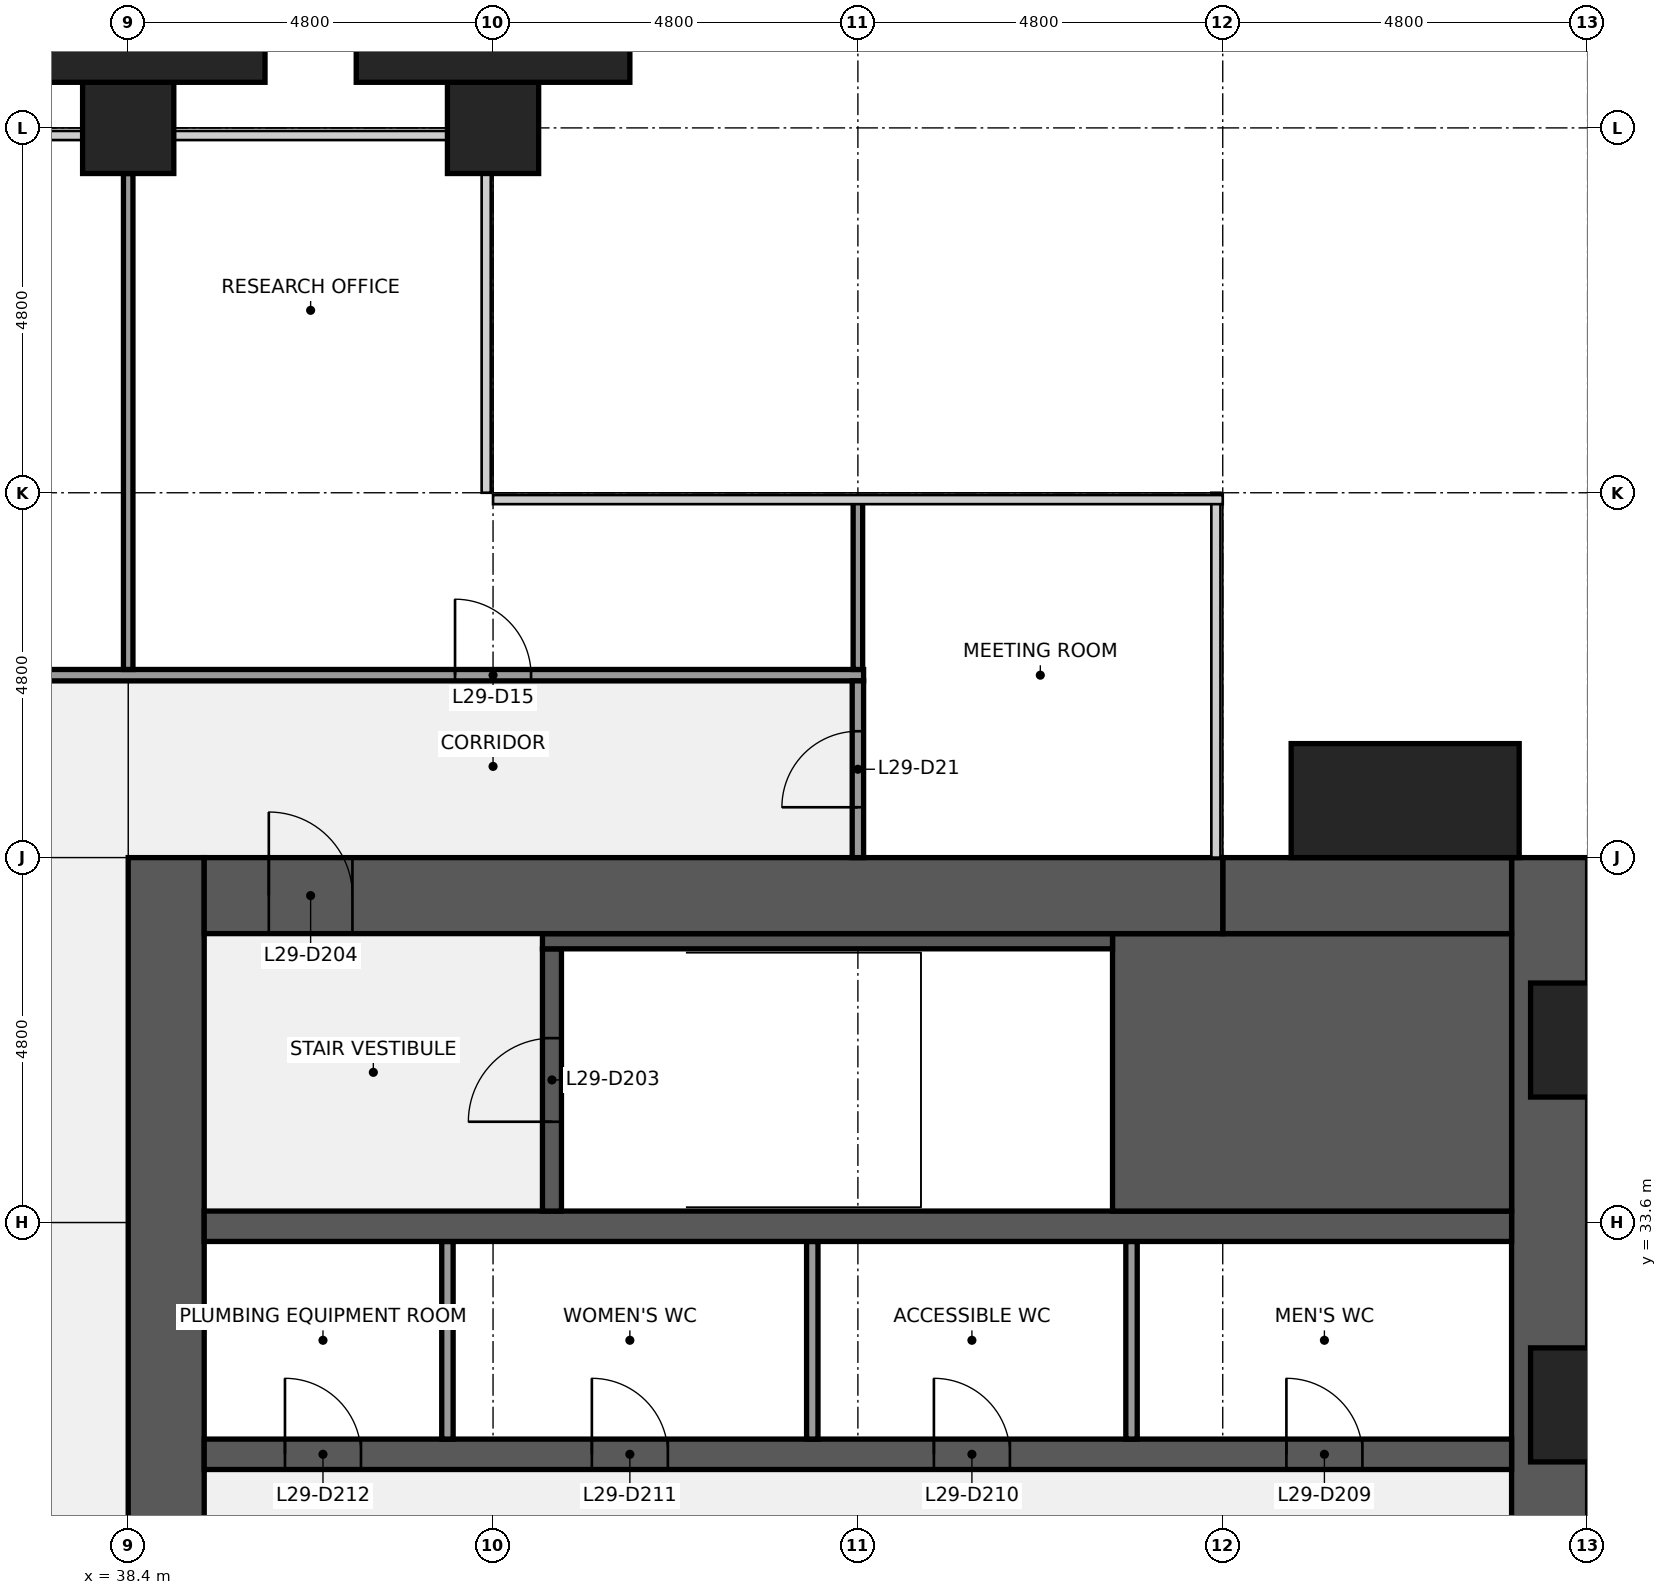
"""IFC4 building model, lengths in metres.
Left out: names, types, materials, properties, quantities, classifications, styles, units other than length and angle.
Written with IfcOpenShell. Run it as: python <this file> out.ifc"""

import sys

from ifc_helpers import new_model, si_unit, direction, frame, frame_2d, origin, origin_2d, place, context, subcontext, project, spatial, rectangle, extrude, element, fill, save


model = new_model("IFC4")
c1 = context("Model", 3, precision=1e-05, world=origin(), true_north=direction((0.0, 1.0)))
c2 = subcontext(c1, "Body", "Model", "MODEL_VIEW")
j1 = project(units=[si_unit("LENGTHUNIT", "METRE"), si_unit("PLANEANGLEUNIT", "RADIAN")], contexts=[c1])
p1 = place(None, origin())
s1 = spatial("IfcSite", under=j1, at=p1, CompositionType="ELEMENT")
p2 = place(p1, origin())
s2 = spatial("IfcBuilding", under=s1, at=p2, CompositionType="ELEMENT")
p3 = place(p2, frame((0.0, 0.0, 136.1)))
s3 = spatial("IfcBuildingStorey", under=s2, at=p3, CompositionType="ELEMENT", Elevation=136.1)
for number, where, z_axis, x_axis in (
    (1, (38.4, 48.0, 0.0), (0.0, 0.0, 1.0), (1.0, 0.0, 0.0)),
    (2, (43.2, 48.0, 0.0), (0.0, 0.0, 1.0), (1.0, 0.0, 0.0)),
):
    element("IfcColumn", number, at=place(p3, frame(where, z_axis=z_axis, x_axis=x_axis)), inside=s3, PredefinedType="COLUMN", context=c2, shape_type="SweptSolid", body=[
        extrude(rectangle(XDim=1.2, YDim=1.2, at=origin_2d()), origin(), (0.0, 0.0, 1.0), 4.0),
    ])
p4 = place(p3, frame((57.1, 38.4, 0.0), z_axis=(0.0, 0.0, 1.0), x_axis=(0.0, -1.0, 0.0)))
e3 = element("IfcWall", 3, at=p4, inside=s3, PredefinedType="SHEAR", context=c2, shape_type="SweptSolid", body=[
    extrude(rectangle(XDim=28.8, YDim=1.0, at=frame_2d((14.4, 0.0))), origin(), (0.0, 0.0, 1.0), 3.84),
])
p5 = place(p4, frame((18.45, 0.0, 0.9)))
e4 = element("IfcOpeningElement", 4, at=p5, cuts=e3, PredefinedType="OPENING", context=c2, shape_type="SweptSolid", body=[
    extrude(rectangle(XDim=1.5, YDim=1.5, at=frame_2d((0.75, 0.75))), frame((0.0, 0.51, 0.0), z_axis=(0.0, -1.0, 0.0), x_axis=(1.0, 0.0, 0.0)), (0.0, 0.0, 1.0), 1.02),
])
p6 = place(p4, frame((8.85, 0.0, 0.9)))
e5 = element("IfcOpeningElement", 5, at=p6, cuts=e3, PredefinedType="OPENING", context=c2, shape_type="SweptSolid", body=[
    extrude(rectangle(XDim=1.5, YDim=1.5, at=frame_2d((0.75, 0.75))), frame((0.0, 0.51, 0.0), z_axis=(0.0, -1.0, 0.0), x_axis=(1.0, 0.0, 0.0)), (0.0, 0.0, 1.0), 1.02),
])
p7 = place(p3, frame((38.9, 9.6, 0.0), z_axis=(0.0, 0.0, 1.0), x_axis=(0.0, 1.0, 0.0)))
e6 = element("IfcWall", 6, at=p7, inside=s3, PredefinedType="SHEAR", context=c2, shape_type="SweptSolid", body=[
    extrude(rectangle(XDim=28.8, YDim=1.0, at=frame_2d((14.4, 0.0))), origin(), (0.0, 0.0, 1.0), 3.84),
])
p8 = place(p7, frame((8.7, 0.0, 0.0)))
e7 = element("IfcOpeningElement", 7, at=p8, cuts=e6, PredefinedType="OPENING", context=c2, shape_type="SweptSolid", body=[
    extrude(rectangle(XDim=1.8, YDim=2.1, at=frame_2d((0.9, 1.05))), frame((0.0, 0.51, 0.0), z_axis=(0.0, -1.0, 0.0), x_axis=(1.0, 0.0, 0.0)), (0.0, 0.0, 1.0), 1.02),
])
p9 = place(p7, frame((18.3, 0.0, 0.0)))
e8 = element("IfcOpeningElement", 8, at=p9, cuts=e6, PredefinedType="OPENING", context=c2, shape_type="SweptSolid", body=[
    extrude(rectangle(XDim=1.8, YDim=2.1, at=frame_2d((0.9, 1.05))), frame((0.0, 0.51, 0.0), z_axis=(0.0, -1.0, 0.0), x_axis=(1.0, 0.0, 0.0)), (0.0, 0.0, 1.0), 1.02),
])
p10 = place(p3, frame((39.4, 30.55, 0.0), z_axis=(0.0, 0.0, 1.0), x_axis=(1.0, 0.0, 0.0)))
e9 = element("IfcWall", 9, at=p10, inside=s3, PredefinedType="SHEAR", context=c2, shape_type="SweptSolid", body=[
    extrude(rectangle(XDim=17.2, YDim=0.4, at=frame_2d((8.6, 0.0))), origin(), (0.0, 0.0, 1.0), 3.84),
])
p11 = place(p10, frame((14.238, 0.0, 0.0)))
e10 = element("IfcOpeningElement", 10, at=p11, cuts=e9, PredefinedType="OPENING", context=c2, shape_type="SweptSolid", body=[
    extrude(rectangle(XDim=1.0, YDim=2.1, at=frame_2d((0.5, 1.05))), frame((0.0, 0.21, 0.0), z_axis=(0.0, -1.0, 0.0), x_axis=(1.0, 0.0, 0.0)), (0.0, 0.0, 1.0), 0.42),
])
p12 = place(p10, frame((9.6, 0.0, 0.0)))
e11 = element("IfcOpeningElement", 11, at=p12, cuts=e9, PredefinedType="OPENING", context=c2, shape_type="SweptSolid", body=[
    extrude(rectangle(XDim=1.0, YDim=2.1, at=frame_2d((0.5, 1.05))), frame((0.0, 0.21, 0.0), z_axis=(0.0, -1.0, 0.0), x_axis=(1.0, 0.0, 0.0)), (0.0, 0.0, 1.0), 0.42),
])
p13 = place(p10, frame((5.1, 0.0, 0.0)))
e12 = element("IfcOpeningElement", 12, at=p13, cuts=e9, PredefinedType="OPENING", context=c2, shape_type="SweptSolid", body=[
    extrude(rectangle(XDim=1.0, YDim=2.1, at=frame_2d((0.5, 1.05))), frame((0.0, 0.21, 0.0), z_axis=(0.0, -1.0, 0.0), x_axis=(1.0, 0.0, 0.0)), (0.0, 0.0, 1.0), 0.42),
])
p14 = place(p10, frame((1.062, 0.0, 0.0)))
e13 = element("IfcOpeningElement", 13, at=p14, cuts=e9, PredefinedType="OPENING", context=c2, shape_type="SweptSolid", body=[
    extrude(rectangle(XDim=1.0, YDim=2.1, at=frame_2d((0.5, 1.05))), frame((0.0, 0.21, 0.0), z_axis=(0.0, -1.0, 0.0), x_axis=(1.0, 0.0, 0.0)), (0.0, 0.0, 1.0), 0.42),
])
for number, where, z_axis, x_axis in (
    (14, (51.6, 30.75, 0.0), (0.0, 0.0, 1.0), (0.0, 1.0, 0.0)),
    (15, (47.4, 30.75, 0.0), (0.0, 0.0, 1.0), (0.0, 1.0, 0.0)),
    (16, (42.6, 30.75, 0.0), (0.0, 0.0, 1.0), (0.0, 1.0, 0.0)),
):
    element("IfcWall", number, at=place(p3, frame(where, z_axis=z_axis, x_axis=x_axis)), inside=s3, PredefinedType="PARTITIONING", context=c2, shape_type="SweptSolid", body=[
        extrude(rectangle(XDim=2.6, YDim=0.15, at=frame_2d((1.3, 0.0))), origin(), (0.0, 0.0, 1.0), 3.84),
    ])
p15 = place(p3, frame((39.4, 33.55, 0.0), z_axis=(0.0, 0.0, 1.0), x_axis=(1.0, 0.0, 0.0)))
e17 = element("IfcWall", 17, at=p15, inside=s3, PredefinedType="SHEAR", context=c2, shape_type="SweptSolid", body=[
    extrude(rectangle(XDim=17.2, YDim=0.4, at=frame_2d((8.6, 0.0))), origin(), (0.0, 0.0, 1.0), 3.84),
])
p16 = place(p3, frame((51.35, 35.575, 0.0), z_axis=(0.0, 0.0, 1.0), x_axis=(1.0, 0.0, 0.0)))
e18 = element("IfcWall", 18, at=p16, inside=s3, PredefinedType="SHEAR", context=c2, shape_type="SweptSolid", body=[
    extrude(rectangle(XDim=5.25, YDim=3.65, at=frame_2d((2.625, 0.0))), origin(), (0.0, 0.0, 1.0), 3.84),
])
p17 = place(p3, frame((43.975, 33.75, 0.0), z_axis=(0.0, 0.0, 1.0), x_axis=(0.0, 1.0, 0.0)))
e19 = element("IfcWall", 19, at=p17, inside=s3, PredefinedType="SHEAR", context=c2, shape_type="SweptSolid", body=[
    extrude(rectangle(XDim=3.45, YDim=0.25, at=frame_2d((1.725, 0.0))), origin(), (0.0, 0.0, 1.0), 3.84),
])
p18 = place(p17, frame((1.175, 0.0, 0.0)))
e20 = element("IfcOpeningElement", 20, at=p18, cuts=e19, PredefinedType="OPENING", context=c2, shape_type="SweptSolid", body=[
    extrude(rectangle(XDim=1.1, YDim=2.1, at=frame_2d((0.55, 1.05))), frame((0.0, 0.135, 0.0), z_axis=(0.0, -1.0, 0.0), x_axis=(1.0, 0.0, 0.0)), (0.0, 0.0, 1.0), 0.27),
])
p19 = place(p3, frame((43.85, 37.3, 0.0), z_axis=(0.0, 0.0, 1.0), x_axis=(1.0, 0.0, 0.0)))
e21 = element("IfcWall", 21, at=p19, inside=s3, PredefinedType="SHEAR", context=c2, shape_type="SweptSolid", body=[
    extrude(rectangle(XDim=7.5, YDim=0.2, at=frame_2d((3.75, 0.0))), origin(), (0.0, 0.0, 1.0), 3.84),
])
p20 = place(p3, frame((52.8, 37.9, 0.0), z_axis=(0.0, 0.0, 1.0), x_axis=(1.0, 0.0, 0.0)))
e22 = element("IfcWall", 22, at=p20, inside=s3, PredefinedType="SHEAR", context=c2, shape_type="SweptSolid", body=[
    extrude(rectangle(XDim=3.8, YDim=1.0, at=frame_2d((1.9, 0.0))), origin(), (0.0, 0.0, 1.0), 3.84),
])
p21 = place(p3, frame((39.4, 37.9, 0.0), z_axis=(0.0, 0.0, 1.0), x_axis=(1.0, 0.0, 0.0)))
e23 = element("IfcWall", 23, at=p21, inside=s3, PredefinedType="SHEAR", context=c2, shape_type="SweptSolid", body=[
    extrude(rectangle(XDim=13.4, YDim=1.0, at=frame_2d((6.7, 0.0))), origin(), (0.0, 0.0, 1.0), 3.84),
])
p22 = place(p21, frame((0.85, 0.0, 0.0)))
e24 = element("IfcOpeningElement", 24, at=p22, cuts=e23, PredefinedType="OPENING", context=c2, shape_type="SweptSolid", body=[
    extrude(rectangle(XDim=1.1, YDim=2.1, at=frame_2d((0.55, 1.05))), frame((0.0, 0.51, 0.0), z_axis=(0.0, -1.0, 0.0), x_axis=(1.0, 0.0, 0.0)), (0.0, 0.0, 1.0), 1.02),
])
p23 = place(p3, frame((9.525, 40.8, 0.0), z_axis=(0.0, 0.0, 1.0), x_axis=(1.0, 0.0, 0.0)))
e25 = element("IfcWall", 25, at=p23, inside=s3, PredefinedType="PARTITIONING", context=c2, shape_type="SweptSolid", body=[
    extrude(rectangle(XDim=38.55, YDim=0.15, at=frame_2d((19.275, 0.0))), origin(), (0.0, 0.0, 1.0), 2.849),
])
p24 = place(p23, frame((4.375, 0.0, 0.0)))
e26 = element("IfcOpeningElement", 26, at=p24, cuts=e25, PredefinedType="OPENING", context=c2, shape_type="SweptSolid", body=[
    extrude(rectangle(XDim=1.0, YDim=2.1, at=frame_2d((0.5, 1.05))), frame((0.0, 0.085, 0.0), z_axis=(0.0, -1.0, 0.0), x_axis=(1.0, 0.0, 0.0)), (0.0, 0.0, 1.0), 0.17),
])
p25 = place(p23, frame((12.775, 0.0, 0.0)))
e27 = element("IfcOpeningElement", 27, at=p25, cuts=e25, PredefinedType="OPENING", context=c2, shape_type="SweptSolid", body=[
    extrude(rectangle(XDim=1.0, YDim=2.1, at=frame_2d((0.5, 1.05))), frame((0.0, 0.085, 0.0), z_axis=(0.0, -1.0, 0.0), x_axis=(1.0, 0.0, 0.0)), (0.0, 0.0, 1.0), 0.17),
])
p26 = place(p23, frame((17.575, 0.0, 0.0)))
e28 = element("IfcOpeningElement", 28, at=p26, cuts=e25, PredefinedType="OPENING", context=c2, shape_type="SweptSolid", body=[
    extrude(rectangle(XDim=1.0, YDim=2.1, at=frame_2d((0.5, 1.05))), frame((0.0, 0.085, 0.0), z_axis=(0.0, -1.0, 0.0), x_axis=(1.0, 0.0, 0.0)), (0.0, 0.0, 1.0), 0.17),
])
p27 = place(p23, frame((21.175, 0.0, 0.0)))
e29 = element("IfcOpeningElement", 29, at=p27, cuts=e25, PredefinedType="OPENING", context=c2, shape_type="SweptSolid", body=[
    extrude(rectangle(XDim=1.0, YDim=2.1, at=frame_2d((0.5, 1.05))), frame((0.0, 0.085, 0.0), z_axis=(0.0, -1.0, 0.0), x_axis=(1.0, 0.0, 0.0)), (0.0, 0.0, 1.0), 0.17),
])
p28 = place(p23, frame((25.975, 0.0, 0.0)))
e30 = element("IfcOpeningElement", 30, at=p28, cuts=e25, PredefinedType="OPENING", context=c2, shape_type="SweptSolid", body=[
    extrude(rectangle(XDim=1.0, YDim=2.1, at=frame_2d((0.5, 1.05))), frame((0.0, 0.085, 0.0), z_axis=(0.0, -1.0, 0.0), x_axis=(1.0, 0.0, 0.0)), (0.0, 0.0, 1.0), 0.17),
])
p29 = place(p23, frame((33.175, 0.0, 0.0)))
e31 = element("IfcOpeningElement", 31, at=p29, cuts=e25, PredefinedType="OPENING", context=c2, shape_type="SweptSolid", body=[
    extrude(rectangle(XDim=1.0, YDim=2.1, at=frame_2d((0.5, 1.05))), frame((0.0, 0.085, 0.0), z_axis=(0.0, -1.0, 0.0), x_axis=(1.0, 0.0, 0.0)), (0.0, 0.0, 1.0), 0.17),
])
p30 = place(p3, frame((38.4, 40.875, 0.0), z_axis=(0.0, 0.0, 1.0), x_axis=(0.0, 1.0, 0.0)))
e32 = element("IfcWall", 32, at=p30, inside=s3, PredefinedType="PARTITIONING", context=c2, shape_type="SweptSolid", body=[
    extrude(rectangle(XDim=6.525, YDim=0.125, at=frame_2d((3.262, 0.0))), origin(), (0.0, 0.0, 1.0), 2.849),
])
p31 = place(p3, frame((48.0, 40.875, 0.0), z_axis=(0.0, 0.0, 1.0), x_axis=(0.0, 1.0, 0.0)))
e33 = element("IfcWall", 33, at=p31, inside=s3, PredefinedType="PARTITIONING", context=c2, shape_type="SweptSolid", body=[
    extrude(rectangle(XDim=2.225, YDim=0.125, at=frame_2d((1.113, 0.0))), origin(), (0.0, 0.0, 1.0), 2.849),
])
p32 = place(p3, frame((48.0, 38.4, 0.0), z_axis=(0.0, 0.0, 1.0), x_axis=(0.0, 1.0, 0.0)))
e34 = element("IfcWall", 34, at=p32, inside=s3, PredefinedType="PARTITIONING", context=c2, shape_type="SweptSolid", body=[
    extrude(rectangle(XDim=2.325, YDim=0.15, at=frame_2d((1.163, 0.0))), origin(), (0.0, 0.0, 1.0), 2.849),
])
p33 = place(p32, frame((0.663, 0.0, 0.0)))
e35 = element("IfcOpeningElement", 35, at=p33, cuts=e34, PredefinedType="OPENING", context=c2, shape_type="SweptSolid", body=[
    extrude(rectangle(XDim=1.0, YDim=2.1, at=frame_2d((0.5, 1.05))), frame((0.0, 0.085, 0.0), z_axis=(0.0, -1.0, 0.0), x_axis=(1.0, 0.0, 0.0)), (0.0, 0.0, 1.0), 0.17),
])
p34 = place(p3, frame((55.2, 39.15, 0.0), z_axis=(0.0, 0.0, 1.0), x_axis=(1.0, 0.0, 0.0)))
e36 = element("IfcColumn", 36, at=p34, inside=s3, PredefinedType="PILASTER", context=c2, shape_type="SweptSolid", body=[
    extrude(rectangle(XDim=3.0, YDim=1.5, at=origin_2d()), origin(), (0.0, 0.0, 1.0), 4.0),
])
for number, where, z_axis, x_axis in (
    (37, (38.4, 49.05, 0.0), (0.0, 0.0, 1.0), (1.0, 0.0, 0.0)),
    (38, (43.2, 49.05, 0.0), (0.0, 0.0, 1.0), (1.0, 0.0, 0.0)),
):
    element("IfcColumn", number, at=place(p3, frame(where, z_axis=z_axis, x_axis=x_axis)), inside=s3, PredefinedType="PILASTER", context=c2, shape_type="SweptSolid", body=[
        extrude(rectangle(XDim=3.6, YDim=0.9, at=origin_2d()), origin(), (0.0, 0.0, 1.0), 4.0),
    ])
p35 = place(p18, origin())
e39 = element("IfcDoor", 39, at=p35, inside=s3, OperationType="SINGLE_SWING_LEFT", PredefinedType="DOOR", context=c2, shape_type="SweptSolid", body=[
    extrude(rectangle(XDim=1.1, YDim=2.1, at=frame_2d((0.55, 1.05))), frame((0.0, 0.025, 0.0), z_axis=(0.0, -1.0, 0.0), x_axis=(1.0, 0.0, 0.0)), (0.0, 0.0, 1.0), 0.05),
])
fill(e20, e39)
p36 = place(p22, origin())
e40 = element("IfcDoor", 40, at=p36, inside=s3, OperationType="SINGLE_SWING_LEFT", PredefinedType="DOOR", context=c2, shape_type="SweptSolid", body=[
    extrude(rectangle(XDim=1.1, YDim=2.1, at=frame_2d((0.55, 1.05))), frame((0.0, 0.025, 0.0), z_axis=(0.0, -1.0, 0.0), x_axis=(1.0, 0.0, 0.0)), (0.0, 0.0, 1.0), 0.05),
])
fill(e24, e40)
p37 = place(p11, origin())
e41 = element("IfcDoor", 41, at=p37, inside=s3, OperationType="SINGLE_SWING_LEFT", PredefinedType="DOOR", context=c2, shape_type="SweptSolid", body=[
    extrude(rectangle(XDim=1.0, YDim=2.1, at=frame_2d((0.5, 1.05))), frame((0.0, 0.025, 0.0), z_axis=(0.0, -1.0, 0.0), x_axis=(1.0, 0.0, 0.0)), (0.0, 0.0, 1.0), 0.05),
])
fill(e10, e41)
p38 = place(p12, origin())
e42 = element("IfcDoor", 42, at=p38, inside=s3, OperationType="SINGLE_SWING_LEFT", PredefinedType="DOOR", context=c2, shape_type="SweptSolid", body=[
    extrude(rectangle(XDim=1.0, YDim=2.1, at=frame_2d((0.5, 1.05))), frame((0.0, 0.025, 0.0), z_axis=(0.0, -1.0, 0.0), x_axis=(1.0, 0.0, 0.0)), (0.0, 0.0, 1.0), 0.05),
])
fill(e11, e42)
p39 = place(p13, origin())
e43 = element("IfcDoor", 43, at=p39, inside=s3, OperationType="SINGLE_SWING_LEFT", PredefinedType="DOOR", context=c2, shape_type="SweptSolid", body=[
    extrude(rectangle(XDim=1.0, YDim=2.1, at=frame_2d((0.5, 1.05))), frame((0.0, 0.025, 0.0), z_axis=(0.0, -1.0, 0.0), x_axis=(1.0, 0.0, 0.0)), (0.0, 0.0, 1.0), 0.05),
])
fill(e12, e43)
p40 = place(p14, origin())
e44 = element("IfcDoor", 44, at=p40, inside=s3, OperationType="SINGLE_SWING_LEFT", PredefinedType="DOOR", context=c2, shape_type="SweptSolid", body=[
    extrude(rectangle(XDim=1.0, YDim=2.1, at=frame_2d((0.5, 1.05))), frame((0.0, 0.025, 0.0), z_axis=(0.0, -1.0, 0.0), x_axis=(1.0, 0.0, 0.0)), (0.0, 0.0, 1.0), 0.05),
])
fill(e13, e44)
p41 = place(p29, origin())
e45 = element("IfcDoor", 45, at=p41, inside=s3, OperationType="SINGLE_SWING_LEFT", PredefinedType="DOOR", context=c2, shape_type="SweptSolid", body=[
    extrude(rectangle(XDim=1.0, YDim=2.1, at=frame_2d((0.5, 1.05))), frame((0.0, 0.025, 0.0), z_axis=(0.0, -1.0, 0.0), x_axis=(1.0, 0.0, 0.0)), (0.0, 0.0, 1.0), 0.05),
])
fill(e31, e45)
p42 = place(p33, origin())
e46 = element("IfcDoor", 46, at=p42, inside=s3, OperationType="SINGLE_SWING_LEFT", PredefinedType="DOOR", context=c2, shape_type="SweptSolid", body=[
    extrude(rectangle(XDim=1.0, YDim=2.1, at=frame_2d((0.5, 1.05))), frame((0.0, 0.025, 0.0), z_axis=(0.0, -1.0, 0.0), x_axis=(1.0, 0.0, 0.0)), (0.0, 0.0, 1.0), 0.05),
])
fill(e35, e46)
save(model, sys.argv[1])
